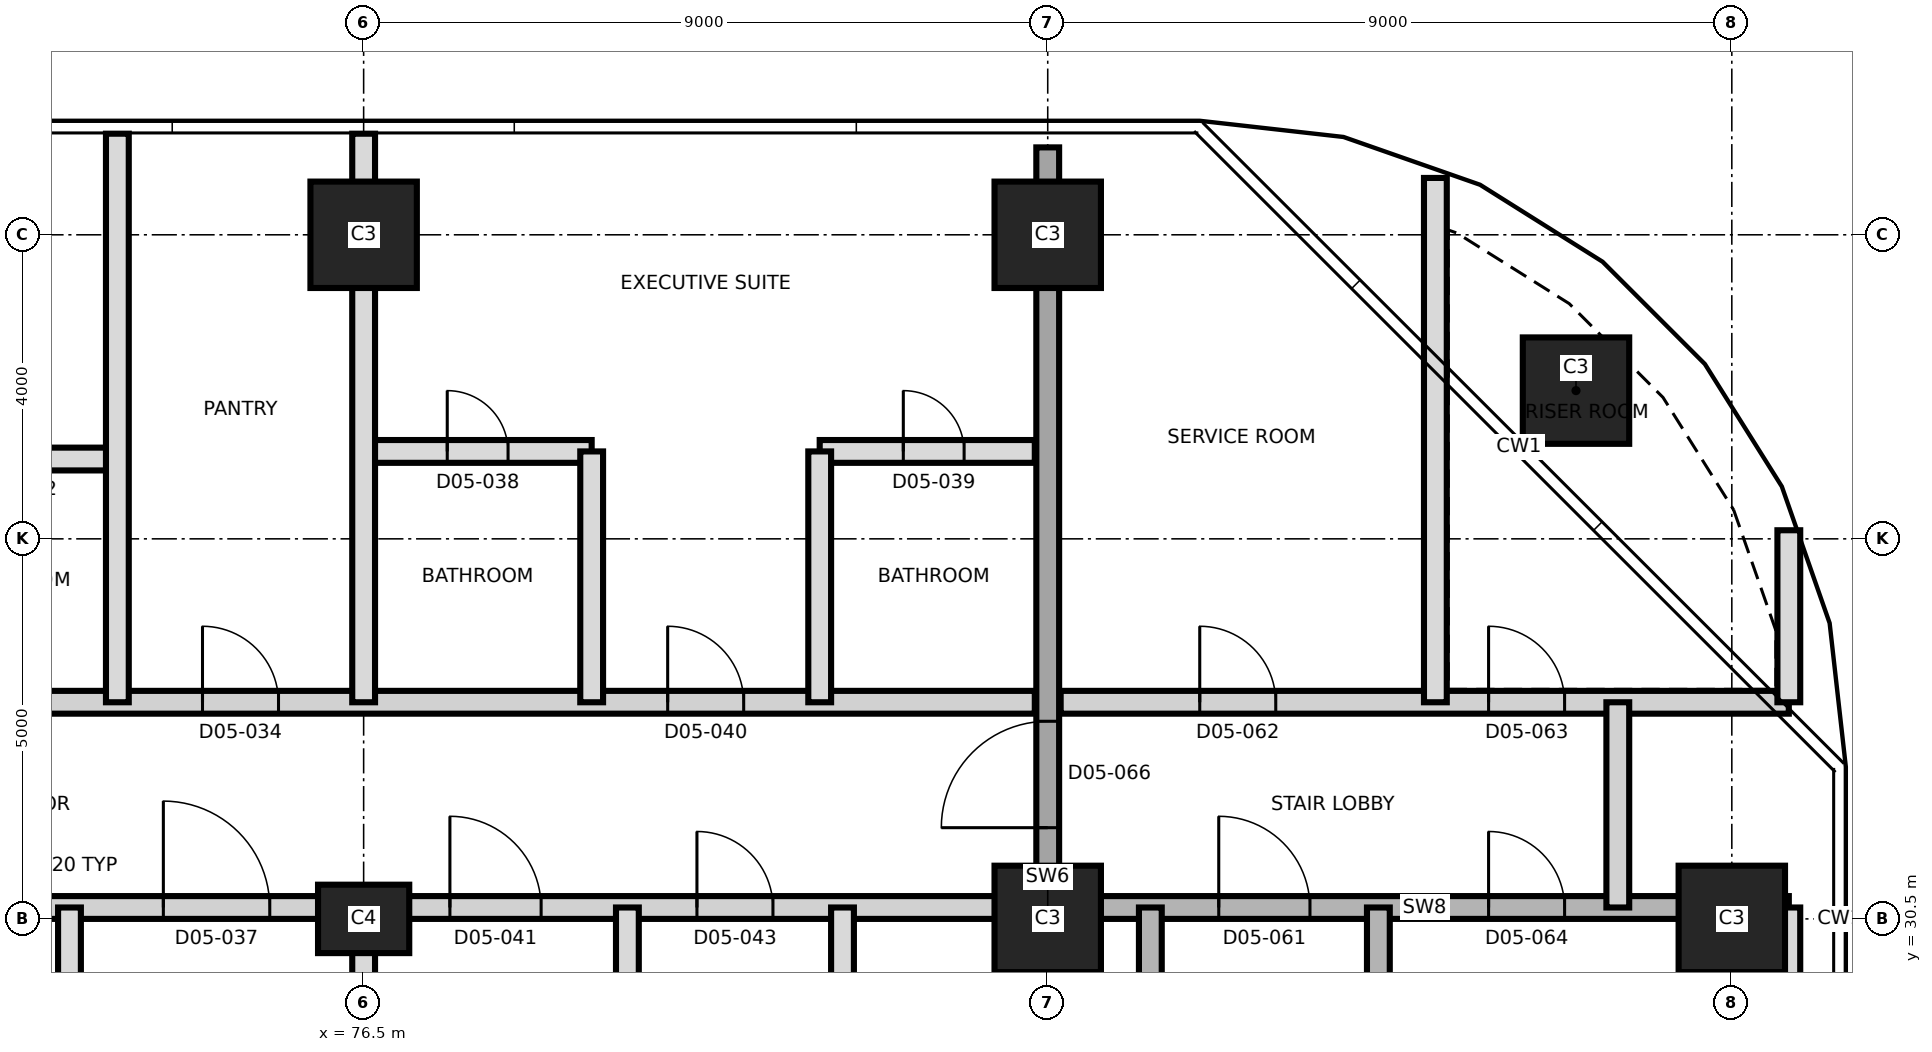
"""IFC4 building model, lengths in metres.
Left out: names, types, materials, properties, quantities, classifications, styles, units other than length and angle.
Written with IfcOpenShell. Run it as: python <this file> out.ifc"""

import sys

from ifc_helpers import new_model, si_unit, direction, frame, frame_2d, origin, origin_2d, place, context, subcontext, project, spatial, rectangle, extrude, element, fill, save


model = new_model("IFC4")
c1 = context("Model", 3, precision=1e-05, world=origin(), true_north=direction((0.0, 1.0)))
c2 = subcontext(c1, "Body", "Model", "MODEL_VIEW")
j1 = project(units=[si_unit("LENGTHUNIT", "METRE"), si_unit("PLANEANGLEUNIT", "RADIAN")], contexts=[c1])
p1 = place(None, origin())
s1 = spatial("IfcSite", under=j1, at=p1, CompositionType="ELEMENT")
p2 = place(p1, origin())
s2 = spatial("IfcBuilding", under=s1, at=p2, CompositionType="ELEMENT")
p3 = place(p2, frame((0.0, 0.0, 77.9)))
s3 = spatial("IfcBuildingStorey", under=s2, at=p3, CompositionType="ELEMENT", Elevation=77.9)
p4 = place(p3, frame((76.5, 30.5, 0.0), z_axis=(0.0, 0.0, 1.0), x_axis=(1.0, 0.0, 0.0)))
e1 = element("IfcColumn", 1, at=p4, inside=s3, PredefinedType="COLUMN", context=c2, shape_type="SweptSolid", body=[
    extrude(rectangle(XDim=1.2, YDim=0.9, at=origin_2d()), origin(), (0.0, 0.0, 1.0), 3.7),
])
for number, where, z_axis, x_axis in (
    (2, (85.5, 30.5, 0.0), (0.0, 0.0, 1.0), (1.0, 0.0, 0.0)),
    (3, (94.5, 30.5, 0.0), (0.0, 0.0, 1.0), (1.0, 0.0, 0.0)),
    (4, (92.45, 37.45, 0.0), (0.0, 0.0, 1.0), (1.0, 0.0, 0.0)),
    (5, (76.5, 39.5, 0.0), (0.0, 0.0, 1.0), (1.0, 0.0, 0.0)),
    (6, (85.5, 39.5, 0.0), (0.0, 0.0, 1.0), (1.0, 0.0, 0.0)),
):
    element("IfcColumn", number, at=place(p3, frame(where, z_axis=z_axis, x_axis=x_axis)), inside=s3, PredefinedType="COLUMN", context=c2, shape_type="SweptSolid", body=[
        extrude(rectangle(XDim=1.4, YDim=1.4, at=origin_2d()), origin(), (0.0, 0.0, 1.0), 3.7),
    ])
p5 = place(p3, frame((85.5, 20.35, 0.0), z_axis=(0.0, 0.0, 1.0), x_axis=(0.0, 1.0, 0.0)))
e7 = element("IfcWall", 7, at=p5, inside=s3, PredefinedType="SHEAR", context=c2, shape_type="SweptSolid", body=[
    extrude(rectangle(XDim=20.3, YDim=0.3, at=frame_2d((10.15, 0.0))), origin(), (0.0, 0.0, 1.0), 3.7),
])
p6 = place(p5, frame((11.35, 0.0, 0.0)))
e8 = element("IfcOpeningElement", 8, at=p6, cuts=e7, PredefinedType="OPENING", context=c2, shape_type="SweptSolid", body=[
    extrude(rectangle(XDim=1.4, YDim=2.1, at=frame_2d((0.7, 1.05))), frame((0.0, 0.16, 0.0), z_axis=(0.0, -1.0, 0.0), x_axis=(1.0, 0.0, 0.0)), (0.0, 0.0, 1.0), 0.32),
])
p7 = place(p3, frame((58.95, 30.65, 0.0), z_axis=(0.0, 0.0, 1.0), x_axis=(1.0, 0.0, 0.0)))
e9 = element("IfcWall", 9, at=p7, inside=s3, PredefinedType="PARTITIONING", context=c2, shape_type="SweptSolid", body=[
    extrude(rectangle(XDim=26.38, YDim=0.3, at=frame_2d((13.19, 0.0))), origin(), (0.0, 0.0, 1.0), 3.4),
])
p8 = place(p7, frame((0.685, 0.0, 0.0)))
e10 = element("IfcOpeningElement", 10, at=p8, cuts=e9, PredefinedType="OPENING", context=c2, shape_type="SweptSolid", body=[
    extrude(rectangle(XDim=1.2, YDim=2.1, at=frame_2d((0.6, 1.05))), frame((0.0, 0.16, 0.0), z_axis=(0.0, -1.0, 0.0), x_axis=(1.0, 0.0, 0.0)), (0.0, 0.0, 1.0), 0.32),
])
p9 = place(p7, frame((3.935, 0.0, 0.0)))
e11 = element("IfcOpeningElement", 11, at=p9, cuts=e9, PredefinedType="OPENING", context=c2, shape_type="SweptSolid", body=[
    extrude(rectangle(XDim=1.0, YDim=2.1, at=frame_2d((0.5, 1.05))), frame((0.0, 0.16, 0.0), z_axis=(0.0, -1.0, 0.0), x_axis=(1.0, 0.0, 0.0)), (0.0, 0.0, 1.0), 0.32),
])
p10 = place(p7, frame((11.965, 0.0, 0.0)))
e12 = element("IfcOpeningElement", 12, at=p10, cuts=e9, PredefinedType="OPENING", context=c2, shape_type="SweptSolid", body=[
    extrude(rectangle(XDim=1.0, YDim=2.1, at=frame_2d((0.5, 1.05))), frame((0.0, 0.16, 0.0), z_axis=(0.0, -1.0, 0.0), x_axis=(1.0, 0.0, 0.0)), (0.0, 0.0, 1.0), 0.32),
])
p11 = place(p7, frame((14.915, 0.0, 0.0)))
e13 = element("IfcOpeningElement", 13, at=p11, cuts=e9, PredefinedType="OPENING", context=c2, shape_type="SweptSolid", body=[
    extrude(rectangle(XDim=1.4, YDim=2.1, at=frame_2d((0.7, 1.05))), frame((0.0, 0.16, 0.0), z_axis=(0.0, -1.0, 0.0), x_axis=(1.0, 0.0, 0.0)), (0.0, 0.0, 1.0), 0.32),
])
p12 = place(p7, frame((18.685, 0.0, 0.0)))
e14 = element("IfcOpeningElement", 14, at=p12, cuts=e9, PredefinedType="OPENING", context=c2, shape_type="SweptSolid", body=[
    extrude(rectangle(XDim=1.2, YDim=2.1, at=frame_2d((0.6, 1.05))), frame((0.0, 0.16, 0.0), z_axis=(0.0, -1.0, 0.0), x_axis=(1.0, 0.0, 0.0)), (0.0, 0.0, 1.0), 0.32),
])
p13 = place(p7, frame((21.935, 0.0, 0.0)))
e15 = element("IfcOpeningElement", 15, at=p13, cuts=e9, PredefinedType="OPENING", context=c2, shape_type="SweptSolid", body=[
    extrude(rectangle(XDim=1.0, YDim=2.1, at=frame_2d((0.5, 1.05))), frame((0.0, 0.16, 0.0), z_axis=(0.0, -1.0, 0.0), x_axis=(1.0, 0.0, 0.0)), (0.0, 0.0, 1.0), 0.32),
])
p14 = place(p3, frame((85.67, 30.65, 0.0), z_axis=(0.0, 0.0, 1.0), x_axis=(1.0, 0.0, 0.0)))
e16 = element("IfcWall", 16, at=p14, inside=s3, PredefinedType="SHEAR", context=c2, shape_type="SweptSolid", body=[
    extrude(rectangle(XDim=9.58, YDim=0.3, at=frame_2d((4.79, 0.0))), origin(), (0.0, 0.0, 1.0), 3.4),
])
p15 = place(p14, frame((2.08, 0.0, 0.0)))
e17 = element("IfcOpeningElement", 17, at=p15, cuts=e16, PredefinedType="OPENING", context=c2, shape_type="SweptSolid", body=[
    extrude(rectangle(XDim=1.2, YDim=2.1, at=frame_2d((0.6, 1.05))), frame((0.0, 0.16, 0.0), z_axis=(0.0, -1.0, 0.0), x_axis=(1.0, 0.0, 0.0)), (0.0, 0.0, 1.0), 0.32),
])
p16 = place(p14, frame((5.63, 0.0, 0.0)))
e18 = element("IfcOpeningElement", 18, at=p16, cuts=e16, PredefinedType="OPENING", context=c2, shape_type="SweptSolid", body=[
    extrude(rectangle(XDim=1.0, YDim=2.1, at=frame_2d((0.5, 1.05))), frame((0.0, 0.16, 0.0), z_axis=(0.0, -1.0, 0.0), x_axis=(1.0, 0.0, 0.0)), (0.0, 0.0, 1.0), 0.32),
])
p17 = place(p3, frame((58.95, 33.35, 0.0), z_axis=(0.0, 0.0, 1.0), x_axis=(1.0, 0.0, 0.0)))
e19 = element("IfcWall", 19, at=p17, inside=s3, PredefinedType="PARTITIONING", context=c2, shape_type="SweptSolid", body=[
    extrude(rectangle(XDim=26.38, YDim=0.3, at=frame_2d((13.19, 0.0))), origin(), (0.0, 0.0, 1.0), 3.4),
])
p18 = place(p17, frame((0.685, 0.0, 0.0)))
e20 = element("IfcOpeningElement", 20, at=p18, cuts=e19, PredefinedType="OPENING", context=c2, shape_type="SweptSolid", body=[
    extrude(rectangle(XDim=1.2, YDim=2.1, at=frame_2d((0.6, 1.05))), frame((0.0, 0.16, 0.0), z_axis=(0.0, -1.0, 0.0), x_axis=(1.0, 0.0, 0.0)), (0.0, 0.0, 1.0), 0.32),
])
p19 = place(p17, frame((3.935, 0.0, 0.0)))
e21 = element("IfcOpeningElement", 21, at=p19, cuts=e19, PredefinedType="OPENING", context=c2, shape_type="SweptSolid", body=[
    extrude(rectangle(XDim=1.0, YDim=2.1, at=frame_2d((0.5, 1.05))), frame((0.0, 0.16, 0.0), z_axis=(0.0, -1.0, 0.0), x_axis=(1.0, 0.0, 0.0)), (0.0, 0.0, 1.0), 0.32),
])
p20 = place(p17, frame((9.58, 0.0, 0.0)))
e22 = element("IfcOpeningElement", 22, at=p20, cuts=e19, PredefinedType="OPENING", context=c2, shape_type="SweptSolid", body=[
    extrude(rectangle(XDim=1.0, YDim=2.1, at=frame_2d((0.5, 1.05))), frame((0.0, 0.16, 0.0), z_axis=(0.0, -1.0, 0.0), x_axis=(1.0, 0.0, 0.0)), (0.0, 0.0, 1.0), 0.32),
])
p21 = place(p17, frame((15.43, 0.0, 0.0)))
e23 = element("IfcOpeningElement", 23, at=p21, cuts=e19, PredefinedType="OPENING", context=c2, shape_type="SweptSolid", body=[
    extrude(rectangle(XDim=1.0, YDim=2.1, at=frame_2d((0.5, 1.05))), frame((0.0, 0.16, 0.0), z_axis=(0.0, -1.0, 0.0), x_axis=(1.0, 0.0, 0.0)), (0.0, 0.0, 1.0), 0.32),
])
p22 = place(p17, frame((21.55, 0.0, 0.0)))
e24 = element("IfcOpeningElement", 24, at=p22, cuts=e19, PredefinedType="OPENING", context=c2, shape_type="SweptSolid", body=[
    extrude(rectangle(XDim=1.0, YDim=2.4, at=frame_2d((0.5, 1.2))), frame((0.0, 0.16, 0.0), z_axis=(0.0, -1.0, 0.0), x_axis=(1.0, 0.0, 0.0)), (0.0, 0.0, 1.0), 0.32),
])
p23 = place(p3, frame((85.67, 33.35, 0.0), z_axis=(0.0, 0.0, 1.0), x_axis=(1.0, 0.0, 0.0)))
e25 = element("IfcWall", 25, at=p23, inside=s3, PredefinedType="PARTITIONING", context=c2, shape_type="SweptSolid", body=[
    extrude(rectangle(XDim=9.58, YDim=0.3, at=frame_2d((4.79, 0.0))), origin(), (0.0, 0.0, 1.0), 3.4),
])
p24 = place(p23, frame((1.83, 0.0, 0.0)))
e26 = element("IfcOpeningElement", 26, at=p24, cuts=e25, PredefinedType="OPENING", context=c2, shape_type="SweptSolid", body=[
    extrude(rectangle(XDim=1.0, YDim=2.1, at=frame_2d((0.5, 1.05))), frame((0.0, 0.16, 0.0), z_axis=(0.0, -1.0, 0.0), x_axis=(1.0, 0.0, 0.0)), (0.0, 0.0, 1.0), 0.32),
])
p25 = place(p23, frame((5.63, 0.0, 0.0)))
e27 = element("IfcOpeningElement", 27, at=p25, cuts=e25, PredefinedType="OPENING", context=c2, shape_type="SweptSolid", body=[
    extrude(rectangle(XDim=1.0, YDim=2.1, at=frame_2d((0.5, 1.05))), frame((0.0, 0.16, 0.0), z_axis=(0.0, -1.0, 0.0), x_axis=(1.0, 0.0, 0.0)), (0.0, 0.0, 1.0), 0.32),
])
p26 = place(p3, frame((70.56, 36.55, 0.0), z_axis=(0.0, 0.0, 1.0), x_axis=(1.0, 0.0, 0.0)))
e28 = element("IfcWall", 28, at=p26, inside=s3, PredefinedType="PARTITIONING", context=c2, shape_type="SweptSolid", body=[
    extrude(rectangle(XDim=2.7, YDim=0.3, at=frame_2d((1.35, 0.0))), origin(), (0.0, 0.0, 1.0), 3.4),
])
p27 = place(p26, frame((0.95, 0.0, 0.0)))
e29 = element("IfcOpeningElement", 29, at=p27, cuts=e28, PredefinedType="OPENING", context=c2, shape_type="SweptSolid", body=[
    extrude(rectangle(XDim=0.8, YDim=2.1, at=frame_2d((0.4, 1.05))), frame((0.0, 0.16, 0.0), z_axis=(0.0, -1.0, 0.0), x_axis=(1.0, 0.0, 0.0)), (0.0, 0.0, 1.0), 0.32),
])
p28 = place(p3, frame((76.5, 36.65, 0.0), z_axis=(0.0, 0.0, 1.0), x_axis=(1.0, 0.0, 0.0)))
e30 = element("IfcWall", 30, at=p28, inside=s3, PredefinedType="PARTITIONING", context=c2, shape_type="SweptSolid", body=[
    extrude(rectangle(XDim=3.0, YDim=0.3, at=frame_2d((1.5, 0.0))), origin(), (0.0, 0.0, 1.0), 3.4),
])
p29 = place(p28, frame((1.1, 0.0, 0.0)))
e31 = element("IfcOpeningElement", 31, at=p29, cuts=e30, PredefinedType="OPENING", context=c2, shape_type="SweptSolid", body=[
    extrude(rectangle(XDim=0.8, YDim=2.1, at=frame_2d((0.4, 1.05))), frame((0.0, 0.16, 0.0), z_axis=(0.0, -1.0, 0.0), x_axis=(1.0, 0.0, 0.0)), (0.0, 0.0, 1.0), 0.32),
])
p30 = place(p3, frame((82.5, 36.65, 0.0), z_axis=(0.0, 0.0, 1.0), x_axis=(1.0, 0.0, 0.0)))
e32 = element("IfcWall", 32, at=p30, inside=s3, PredefinedType="PARTITIONING", context=c2, shape_type="SweptSolid", body=[
    extrude(rectangle(XDim=2.83, YDim=0.3, at=frame_2d((1.415, 0.0))), origin(), (0.0, 0.0, 1.0), 3.4),
])
p31 = place(p30, frame((1.1, 0.0, 0.0)))
e33 = element("IfcOpeningElement", 33, at=p31, cuts=e32, PredefinedType="OPENING", context=c2, shape_type="SweptSolid", body=[
    extrude(rectangle(XDim=0.8, YDim=2.1, at=frame_2d((0.4, 1.05))), frame((0.0, 0.16, 0.0), z_axis=(0.0, -1.0, 0.0), x_axis=(1.0, 0.0, 0.0)), (0.0, 0.0, 1.0), 0.32),
])
p32 = place(p3, frame((72.63, 20.35, 0.0), z_axis=(0.0, 0.0, 1.0), x_axis=(0.0, 1.0, 0.0)))
e34 = element("IfcWall", 34, at=p32, inside=s3, PredefinedType="PARTITIONING", context=c2, shape_type="SweptSolid", body=[
    extrude(rectangle(XDim=10.3, YDim=0.3, at=frame_2d((5.15, 0.0))), origin(), (0.0, 0.0, 1.0), 3.4),
])
p33 = place(p3, frame((73.26, 33.35, 0.0), z_axis=(0.0, 0.0, 1.0), x_axis=(0.0, 1.0, 0.0)))
e35 = element("IfcWall", 35, at=p33, inside=s3, PredefinedType="PARTITIONING", context=c2, shape_type="SweptSolid", body=[
    extrude(rectangle(XDim=7.48, YDim=0.3, at=frame_2d((3.74, 0.0))), origin(), (0.0, 0.0, 1.0), 3.4),
])
p34 = place(p3, frame((76.5, 20.35, 0.0), z_axis=(0.0, 0.0, 1.0), x_axis=(0.0, 1.0, 0.0)))
e36 = element("IfcWall", 36, at=p34, inside=s3, PredefinedType="PARTITIONING", context=c2, shape_type="SweptSolid", body=[
    extrude(rectangle(XDim=10.3, YDim=0.3, at=frame_2d((5.15, 0.0))), origin(), (0.0, 0.0, 1.0), 3.4),
])
p35 = place(p3, frame((76.5, 33.35, 0.0), z_axis=(0.0, 0.0, 1.0), x_axis=(0.0, 1.0, 0.0)))
e37 = element("IfcWall", 37, at=p35, inside=s3, PredefinedType="PARTITIONING", context=c2, shape_type="SweptSolid", body=[
    extrude(rectangle(XDim=7.48, YDim=0.3, at=frame_2d((3.74, 0.0))), origin(), (0.0, 0.0, 1.0), 3.4),
])
p36 = place(p3, frame((79.5, 33.35, 0.0), z_axis=(0.0, 0.0, 1.0), x_axis=(0.0, 1.0, 0.0)))
e38 = element("IfcWall", 38, at=p36, inside=s3, PredefinedType="PARTITIONING", context=c2, shape_type="SweptSolid", body=[
    extrude(rectangle(XDim=3.3, YDim=0.3, at=frame_2d((1.65, 0.0))), origin(), (0.0, 0.0, 1.0), 3.4),
])
p37 = place(p3, frame((79.97, 20.35, 0.0), z_axis=(0.0, 0.0, 1.0), x_axis=(0.0, 1.0, 0.0)))
e39 = element("IfcWall", 39, at=p37, inside=s3, PredefinedType="PARTITIONING", context=c2, shape_type="SweptSolid", body=[
    extrude(rectangle(XDim=10.3, YDim=0.3, at=frame_2d((5.15, 0.0))), origin(), (0.0, 0.0, 1.0), 3.4),
])
p38 = place(p3, frame((82.5, 33.35, 0.0), z_axis=(0.0, 0.0, 1.0), x_axis=(0.0, 1.0, 0.0)))
e40 = element("IfcWall", 40, at=p38, inside=s3, PredefinedType="PARTITIONING", context=c2, shape_type="SweptSolid", body=[
    extrude(rectangle(XDim=3.3, YDim=0.3, at=frame_2d((1.65, 0.0))), origin(), (0.0, 0.0, 1.0), 3.4),
])
p39 = place(p3, frame((82.8, 27.45, 0.0), z_axis=(0.0, 0.0, 1.0), x_axis=(0.0, 1.0, 0.0)))
e41 = element("IfcWall", 41, at=p39, inside=s3, PredefinedType="PARTITIONING", context=c2, shape_type="SweptSolid", body=[
    extrude(rectangle(XDim=3.2, YDim=0.3, at=frame_2d((1.6, 0.0))), origin(), (0.0, 0.0, 1.0), 3.4),
])
for number, where, z_axis, x_axis in (
    (42, (86.85, 21.8, 0.0), (0.0, 0.0, 1.0), (0.0, 1.0, 0.0)),
    (43, (89.85, 21.8, 0.0), (0.0, 0.0, 1.0), (0.0, 1.0, 0.0)),
):
    element("IfcWall", number, at=place(p3, frame(where, z_axis=z_axis, x_axis=x_axis)), inside=s3, PredefinedType="SHEAR", context=c2, shape_type="SweptSolid", body=[
        extrude(rectangle(XDim=8.85, YDim=0.3, at=frame_2d((4.425, 0.0))), origin(), (0.0, 0.0, 1.0), 3.4),
    ])
p40 = place(p3, frame((90.6, 33.35, 0.0), z_axis=(0.0, 0.0, 1.0), x_axis=(0.0, 1.0, 0.0)))
e44 = element("IfcWall", 44, at=p40, inside=s3, PredefinedType="PARTITIONING", context=c2, shape_type="SweptSolid", body=[
    extrude(rectangle(XDim=6.898, YDim=0.3, at=frame_2d((3.449, 0.0))), origin(), (0.0, 0.0, 1.0), 3.4),
])
p41 = place(p3, frame((93.0, 30.65, 0.0), z_axis=(0.0, 0.0, 1.0), x_axis=(0.0, 1.0, 0.0)))
e45 = element("IfcWall", 45, at=p41, inside=s3, PredefinedType="PARTITIONING", context=c2, shape_type="SweptSolid", body=[
    extrude(rectangle(XDim=2.7, YDim=0.3, at=frame_2d((1.35, 0.0))), origin(), (0.0, 0.0, 1.0), 3.4),
])
p42 = place(p3, frame((95.25, 25.387, 0.0), z_axis=(0.0, 0.0, 1.0), x_axis=(0.0, 1.0, 0.0)))
e46 = element("IfcWall", 46, at=p42, inside=s3, PredefinedType="PARTITIONING", context=c2, shape_type="SweptSolid", body=[
    extrude(rectangle(XDim=5.263, YDim=0.3, at=frame_2d((2.631, 0.0))), origin(), (0.0, 0.0, 1.0), 3.4),
])
p43 = place(p3, frame((95.25, 33.35, 0.0), z_axis=(0.0, 0.0, 1.0), x_axis=(0.0, 1.0, 0.0)))
e47 = element("IfcWall", 47, at=p43, inside=s3, PredefinedType="PARTITIONING", context=c2, shape_type="SweptSolid", body=[
    extrude(rectangle(XDim=2.263, YDim=0.3, at=frame_2d((1.131, 0.0))), origin(), (0.0, 0.0, 1.0), 3.4),
])
p44 = place(p21, origin())
e48 = element("IfcDoor", 48, at=p44, inside=s3, OperationType="SINGLE_SWING_RIGHT", PredefinedType="DOOR", context=c2, shape_type="SweptSolid", body=[
    extrude(rectangle(XDim=1.0, YDim=2.1, at=frame_2d((0.5, 1.05))), frame((0.0, 0.025, 0.0), z_axis=(0.0, -1.0, 0.0), x_axis=(1.0, 0.0, 0.0)), (0.0, 0.0, 1.0), 0.05),
])
fill(e23, e48)
p45 = place(p11, origin())
e49 = element("IfcDoor", 49, at=p45, inside=s3, OperationType="SINGLE_SWING_RIGHT", PredefinedType="DOOR", context=c2, shape_type="SweptSolid", body=[
    extrude(rectangle(XDim=1.4, YDim=2.1, at=frame_2d((0.7, 1.05))), frame((0.0, 0.025, 0.0), z_axis=(0.0, -1.0, 0.0), x_axis=(1.0, 0.0, 0.0)), (0.0, 0.0, 1.0), 0.05),
])
fill(e13, e49)
p46 = place(p29, origin())
e50 = element("IfcDoor", 50, at=p46, inside=s3, OperationType="SINGLE_SWING_LEFT", PredefinedType="DOOR", context=c2, shape_type="SweptSolid", body=[
    extrude(rectangle(XDim=0.8, YDim=2.1, at=frame_2d((0.4, 1.05))), frame((0.0, 0.025, 0.0), z_axis=(0.0, -1.0, 0.0), x_axis=(1.0, 0.0, 0.0)), (0.0, 0.0, 1.0), 0.05),
])
fill(e31, e50)
p47 = place(p31, origin())
e51 = element("IfcDoor", 51, at=p47, inside=s3, OperationType="SINGLE_SWING_RIGHT", PredefinedType="DOOR", context=c2, shape_type="SweptSolid", body=[
    extrude(rectangle(XDim=0.8, YDim=2.1, at=frame_2d((0.4, 1.05))), frame((0.0, 0.025, 0.0), z_axis=(0.0, -1.0, 0.0), x_axis=(1.0, 0.0, 0.0)), (0.0, 0.0, 1.0), 0.05),
])
fill(e33, e51)
p48 = place(p22, origin())
e52 = element("IfcDoor", 52, at=p48, inside=s3, OperationType="SINGLE_SWING_LEFT", PredefinedType="DOOR", context=c2, shape_type="SweptSolid", body=[
    extrude(rectangle(XDim=1.0, YDim=2.4, at=frame_2d((0.5, 1.2))), frame((0.0, 0.025, 0.0), z_axis=(0.0, -1.0, 0.0), x_axis=(1.0, 0.0, 0.0)), (0.0, 0.0, 1.0), 0.05),
])
fill(e24, e52)
p49 = place(p12, origin())
e53 = element("IfcDoor", 53, at=p49, inside=s3, OperationType="SINGLE_SWING_LEFT", PredefinedType="DOOR", context=c2, shape_type="SweptSolid", body=[
    extrude(rectangle(XDim=1.2, YDim=2.1, at=frame_2d((0.6, 1.05))), frame((0.0, 0.025, 0.0), z_axis=(0.0, -1.0, 0.0), x_axis=(1.0, 0.0, 0.0)), (0.0, 0.0, 1.0), 0.05),
])
fill(e14, e53)
p50 = place(p13, origin())
e54 = element("IfcDoor", 54, at=p50, inside=s3, OperationType="SINGLE_SWING_LEFT", PredefinedType="DOOR", context=c2, shape_type="SweptSolid", body=[
    extrude(rectangle(XDim=1.0, YDim=2.1, at=frame_2d((0.5, 1.05))), frame((0.0, 0.025, 0.0), z_axis=(0.0, -1.0, 0.0), x_axis=(1.0, 0.0, 0.0)), (0.0, 0.0, 1.0), 0.05),
])
fill(e15, e54)
p51 = place(p15, origin())
e55 = element("IfcDoor", 55, at=p51, inside=s3, OperationType="SINGLE_SWING_LEFT", PredefinedType="DOOR", context=c2, shape_type="SweptSolid", body=[
    extrude(rectangle(XDim=1.2, YDim=2.1, at=frame_2d((0.6, 1.05))), frame((0.0, 0.025, 0.0), z_axis=(0.0, -1.0, 0.0), x_axis=(1.0, 0.0, 0.0)), (0.0, 0.0, 1.0), 0.05),
])
fill(e17, e55)
p52 = place(p24, origin())
e56 = element("IfcDoor", 56, at=p52, inside=s3, OperationType="SINGLE_SWING_LEFT", PredefinedType="DOOR", context=c2, shape_type="SweptSolid", body=[
    extrude(rectangle(XDim=1.0, YDim=2.1, at=frame_2d((0.5, 1.05))), frame((0.0, 0.025, 0.0), z_axis=(0.0, -1.0, 0.0), x_axis=(1.0, 0.0, 0.0)), (0.0, 0.0, 1.0), 0.05),
])
fill(e26, e56)
p53 = place(p25, origin())
e57 = element("IfcDoor", 57, at=p53, inside=s3, OperationType="SINGLE_SWING_RIGHT", PredefinedType="DOOR", context=c2, shape_type="SweptSolid", body=[
    extrude(rectangle(XDim=1.0, YDim=2.1, at=frame_2d((0.5, 1.05))), frame((0.0, 0.025, 0.0), z_axis=(0.0, -1.0, 0.0), x_axis=(1.0, 0.0, 0.0)), (0.0, 0.0, 1.0), 0.05),
])
fill(e27, e57)
p54 = place(p16, origin())
e58 = element("IfcDoor", 58, at=p54, inside=s3, OperationType="SINGLE_SWING_LEFT", PredefinedType="DOOR", context=c2, shape_type="SweptSolid", body=[
    extrude(rectangle(XDim=1.0, YDim=2.1, at=frame_2d((0.5, 1.05))), frame((0.0, 0.025, 0.0), z_axis=(0.0, -1.0, 0.0), x_axis=(1.0, 0.0, 0.0)), (0.0, 0.0, 1.0), 0.05),
])
fill(e18, e58)
p55 = place(p6, origin())
e59 = element("IfcDoor", 59, at=p55, inside=s3, OperationType="SINGLE_SWING_RIGHT", PredefinedType="DOOR", context=c2, shape_type="SweptSolid", body=[
    extrude(rectangle(XDim=1.4, YDim=2.1, at=frame_2d((0.7, 1.05))), frame((0.0, 0.025, 0.0), z_axis=(0.0, -1.0, 0.0), x_axis=(1.0, 0.0, 0.0)), (0.0, 0.0, 1.0), 0.05),
])
fill(e8, e59)
save(model, sys.argv[1])
